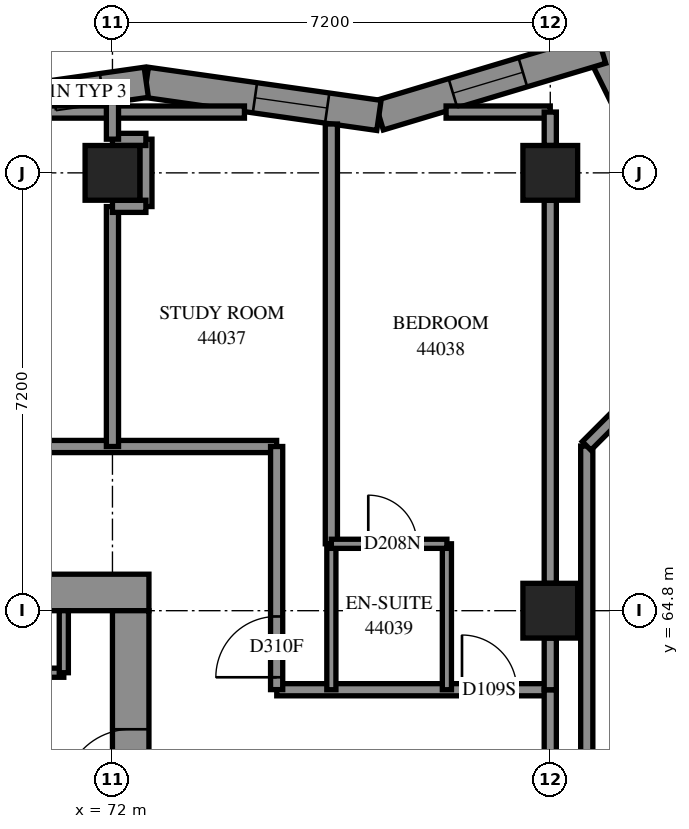
"""IFC4 building model, lengths in metres.
Left out: names, types, materials, properties, quantities, classifications, styles, units other than length and angle.
Written with IfcOpenShell. Run it as: python <this file> out.ifc"""

import sys

from ifc_helpers import new_model, si_unit, direction, frame, frame_2d, origin, origin_2d, place, context, subcontext, project, spatial, polyline, rectangle, outline, extrude, element, fill, save


model = new_model("IFC4")
c1 = context("Model", 3, precision=1e-05, world=origin(), true_north=direction((0.0, 1.0)))
c2 = subcontext(c1, "Body", "Model", "MODEL_VIEW")
j1 = project(units=[si_unit("LENGTHUNIT", "METRE"), si_unit("PLANEANGLEUNIT", "RADIAN")], contexts=[c1])
p1 = place(None, origin())
s1 = spatial("IfcSite", under=j1, at=p1, CompositionType="ELEMENT")
p2 = place(p1, origin())
s2 = spatial("IfcBuilding", under=s1, at=p2, CompositionType="ELEMENT")
p3 = place(p2, frame((0.0, 0.0, 162.6)))
s3 = spatial("IfcBuildingStorey", under=s2, at=p3, CompositionType="ELEMENT", Elevation=162.6)
for number, where, z_axis, x_axis in (
    (1, (72.0, 72.0, 0.0), (0.0, 0.0, 1.0), (1.0, 0.0, 0.0)),
    (2, (79.2, 64.8, 0.0), (0.0, 0.0, 1.0), (1.0, 0.0, 0.0)),
    (3, (79.2, 72.0, 0.0), (0.0, 0.0, 1.0), (1.0, 0.0, 0.0)),
):
    element("IfcColumn", number, at=place(p3, frame(where, z_axis=z_axis, x_axis=x_axis)), inside=s3, PredefinedType="COLUMN", context=c2, shape_type="SweptSolid", body=[
        extrude(rectangle(XDim=0.9, YDim=0.9, at=origin_2d()), origin(), (0.0, 0.0, 1.0), 3.1),
    ])
p4 = place(p3, frame((57.0, 65.1, -0.3), z_axis=(0.0, 0.0, 1.0), x_axis=(1.0, 0.0, 0.0)))
e4 = element("IfcWall", 4, at=p4, inside=s3, PredefinedType="SHEAR", context=c2, shape_type="SweptSolid", body=[
    extrude(rectangle(XDim=15.6, YDim=0.6, at=frame_2d((7.8, 0.0))), origin(), (0.0, 0.0, 1.0), 2.7),
])
p5 = place(p4, frame((10.6, 0.0, 0.3)))
e5 = element("IfcOpeningElement", 5, at=p5, cuts=e4, PredefinedType="OPENING", context=c2, shape_type="SweptSolid", body=[
    extrude(rectangle(XDim=0.8, YDim=2.1, at=frame_2d((0.4, 1.05))), frame((0.0, 0.31, 0.0), z_axis=(0.0, -1.0, 0.0), x_axis=(1.0, 0.0, 0.0)), (0.0, 0.0, 1.0), 0.62),
])
p6 = place(p3, frame((72.3, 50.4, -0.3), z_axis=(0.0, 0.0, 1.0), x_axis=(0.0, 1.0, 0.0)))
e6 = element("IfcWall", 6, at=p6, inside=s3, PredefinedType="SHEAR", context=c2, shape_type="SweptSolid", body=[
    extrude(rectangle(XDim=14.4, YDim=0.6, at=frame_2d((7.2, 0.0))), origin(), (0.0, 0.0, 1.0), 2.7),
])
p7 = place(p6, frame((4.55, 0.0, 0.3)))
e7 = element("IfcOpeningElement", 7, at=p7, cuts=e6, PredefinedType="OPENING", context=c2, shape_type="SweptSolid", body=[
    extrude(rectangle(XDim=1.1, YDim=2.1, at=frame_2d((0.55, 1.05))), frame((0.0, 0.31, 0.0), z_axis=(0.0, -1.0, 0.0), x_axis=(1.0, 0.0, 0.0)), (0.0, 0.0, 1.0), 0.62),
])
p8 = place(p6, frame((11.35, 0.0, 0.3)))
e8 = element("IfcOpeningElement", 8, at=p8, cuts=e6, PredefinedType="OPENING", context=c2, shape_type="SweptSolid", body=[
    extrude(rectangle(XDim=1.1, YDim=2.1, at=frame_2d((0.55, 1.05))), frame((0.0, 0.31, 0.0), z_axis=(0.0, -1.0, 0.0), x_axis=(1.0, 0.0, 0.0)), (0.0, 0.0, 1.0), 0.62),
])
p9 = place(p3, frame((81.557, 70.978, 0.0), z_axis=(0.0, 0.0, 1.0), x_axis=(-0.4436419496, 0.8962041177, 0.0)))
e9 = element("IfcWall", 9, at=p9, inside=s3, PredefinedType="SOLIDWALL", context=c2, shape_type="SweptSolid", body=[
    extrude(outline(polyline([(0.062, -0.25), (3.63, -0.25), (3.208, 0.25), (-0.062, 0.25), (0.062, -0.25)])), origin(), (0.0, 0.0, 1.0), 3.1),
])
p10 = place(p9, frame((0.761, 0.0, 0.45)))
e10 = element("IfcOpeningElement", 10, at=p10, cuts=e9, PredefinedType="OPENING", context=c2, shape_type="SweptSolid", body=[
    extrude(rectangle(XDim=1.2, YDim=2.5, at=frame_2d((0.6, 1.25))), frame((0.0, 0.26, 0.0), z_axis=(0.0, -1.0, 0.0), x_axis=(1.0, 0.0, 0.0)), (0.0, 0.0, 1.0), 0.52),
])
p11 = place(p3, frame((80.04, 74.042, 0.0), z_axis=(0.0, 0.0, 1.0), x_axis=(-0.9578277268, -0.2873430803, 0.0)))
e11 = element("IfcWall", 11, at=p11, inside=s3, PredefinedType="SOLIDWALL", context=c2, shape_type="SweptSolid", body=[
    extrude(outline(polyline([(-0.211, -0.25), (3.764, -0.25), (3.873, 0.25), (0.211, 0.25), (-0.211, -0.25)])), origin(), (0.0, 0.0, 1.0), 3.1),
])
p12 = place(p11, frame((1.348, 0.0, 0.45)))
e12 = element("IfcOpeningElement", 12, at=p12, cuts=e11, PredefinedType="OPENING", context=c2, shape_type="SweptSolid", body=[
    extrude(rectangle(XDim=1.2, YDim=2.5, at=frame_2d((0.6, 1.25))), frame((0.0, 0.26, 0.0), z_axis=(0.0, -1.0, 0.0), x_axis=(1.0, 0.0, 0.0)), (0.0, 0.0, 1.0), 0.52),
])
p13 = place(p3, frame((76.382, 72.945, 0.0), z_axis=(0.0, 0.0, 1.0), x_axis=(-0.9900145925, 0.140964913, 0.0)))
e13 = element("IfcWall", 13, at=p13, inside=s3, PredefinedType="SOLIDWALL", context=c2, shape_type="SweptSolid", body=[
    extrude(outline(polyline([(0.055, -0.25), (3.9, -0.25), (3.829, 0.25), (-0.055, 0.25), (0.055, -0.25)])), origin(), (0.0, 0.0, 1.0), 3.1),
])
p14 = place(p13, frame((0.86, 0.0, 0.45)))
e14 = element("IfcOpeningElement", 14, at=p14, cuts=e13, PredefinedType="OPENING", context=c2, shape_type="SweptSolid", body=[
    extrude(rectangle(XDim=1.2, YDim=2.5, at=frame_2d((0.6, 1.25))), frame((0.0, 0.26, 0.0), z_axis=(0.0, -1.0, 0.0), x_axis=(1.0, 0.0, 0.0)), (0.0, 0.0, 1.0), 0.52),
])
p15 = place(p3, frame((72.556, 73.49, 0.0), z_axis=(0.0, 0.0, 1.0), x_axis=(-0.990016994, -0.1409480459, 0.0)))
e15 = element("IfcWall", 15, at=p15, inside=s3, PredefinedType="SOLIDWALL", context=c2, shape_type="SweptSolid", body=[
    extrude(outline(polyline([(-0.036, -0.25), (3.81, -0.25), (3.881, 0.25), (0.036, 0.25), (-0.036, -0.25)])), origin(), (0.0, 0.0, 1.0), 3.1),
])
p16 = place(p15, frame((0.735, 0.0, 0.45)))
e16 = element("IfcOpeningElement", 16, at=p16, cuts=e15, PredefinedType="OPENING", context=c2, shape_type="SweptSolid", body=[
    extrude(rectangle(XDim=0.8, YDim=2.5, at=frame_2d((0.4, 1.25))), frame((0.0, 0.26, 0.0), z_axis=(0.0, -1.0, 0.0), x_axis=(1.0, 0.0, 0.0)), (0.0, 0.0, 1.0), 0.52),
])
p17 = place(p15, frame((1.985, 0.0, 0.45)))
e17 = element("IfcOpeningElement", 17, at=p17, cuts=e15, PredefinedType="OPENING", context=c2, shape_type="SweptSolid", body=[
    extrude(rectangle(XDim=1.3, YDim=2.5, at=frame_2d((0.65, 1.25))), frame((0.0, 0.26, 0.0), z_axis=(0.0, -1.0, 0.0), x_axis=(1.0, 0.0, 0.0)), (0.0, 0.0, 1.0), 0.52),
])
p18 = place(p3, frame((64.95, 63.78, 0.0), z_axis=(0.0, 0.0, 1.0), x_axis=(1.0, 0.0, 0.0)))
e18 = element("IfcWall", 18, at=p18, inside=s3, PredefinedType="PARTITIONING", context=c2, shape_type="SweptSolid", body=[
    extrude(rectangle(XDim=6.25, YDim=0.15, at=frame_2d((3.125, 0.0))), origin(), (0.0, 0.0, 1.0), 3.1),
])
p19 = place(p3, frame((71.2, 63.78, 0.0), z_axis=(0.0, 0.0, 1.0), x_axis=(0.0, 1.0, 0.0)))
e19 = element("IfcWall", 19, at=p19, inside=s3, PredefinedType="PARTITIONING", context=c2, shape_type="SweptSolid", body=[
    extrude(rectangle(XDim=1.02, YDim=0.15, at=frame_2d((0.51, 0.0))), origin(), (0.0, 0.0, 1.0), 3.1),
])
p20 = place(p3, frame((54.9, 67.5, 0.0), z_axis=(0.0, 0.0, 1.0), x_axis=(1.0, 0.0, 0.0)))
e20 = element("IfcWall", 20, at=p20, inside=s3, PredefinedType="PARTITIONING", context=c2, shape_type="SweptSolid", body=[
    extrude(rectangle(XDim=19.8, YDim=0.2, at=frame_2d((9.9, 0.0))), origin(), (0.0, 0.0, 1.0), 3.1),
])
p21 = place(p20, frame((6.599, 0.0, 0.0)))
e21 = element("IfcOpeningElement", 21, at=p21, cuts=e20, PredefinedType="OPENING", context=c2, shape_type="SweptSolid", body=[
    extrude(rectangle(XDim=0.9, YDim=2.1, at=frame_2d((0.45, 1.05))), frame((0.0, 0.11, 0.0), z_axis=(0.0, -1.0, 0.0), x_axis=(1.0, 0.0, 0.0)), (0.0, 0.0, 1.0), 0.22),
])
p22 = place(p20, frame((14.101, 0.0, 0.0)))
e22 = element("IfcOpeningElement", 22, at=p22, cuts=e20, PredefinedType="OPENING", context=c2, shape_type="SweptSolid", body=[
    extrude(rectangle(XDim=0.9, YDim=2.1, at=frame_2d((0.45, 1.05))), frame((0.0, 0.11, 0.0), z_axis=(0.0, -1.0, 0.0), x_axis=(1.0, 0.0, 0.0)), (0.0, 0.0, 1.0), 0.22),
])
p23 = place(p3, frame((79.8, 56.054, 0.0), z_axis=(0.0, 0.0, 1.0), x_axis=(0.0, 1.0, 0.0)))
e23 = element("IfcWall", 23, at=p23, inside=s3, PredefinedType="PARTITIONING", context=c2, shape_type="SweptSolid", body=[
    extrude(rectangle(XDim=11.454, YDim=0.2, at=frame_2d((5.727, 0.0))), origin(), (0.0, 0.0, 1.0), 3.1),
])
p24 = place(p3, frame((79.799, 56.055, 0.0), z_axis=(0.0, 0.0, 1.0), x_axis=(0.7071067812, 0.7071067812, 0.0)))
e24 = element("IfcWall", 24, at=p24, inside=s3, PredefinedType="PARTITIONING", context=c2, shape_type="SweptSolid", body=[
    extrude(rectangle(XDim=9.95, YDim=0.2, at=frame_2d((4.975, 0.0))), origin(), (0.0, 0.0, 1.0), 3.1),
])
p25 = place(p24, frame((1.071, 0.0, 0.0)))
e25 = element("IfcOpeningElement", 25, at=p25, cuts=e24, PredefinedType="OPENING", context=c2, shape_type="SweptSolid", body=[
    extrude(rectangle(XDim=1.0, YDim=2.1, at=frame_2d((0.5, 1.05))), frame((0.0, 0.11, 0.0), z_axis=(0.0, -1.0, 0.0), x_axis=(1.0, 0.0, 0.0)), (0.0, 0.0, 1.0), 0.22),
])
p26 = place(p3, frame((75.6, 65.9, 0.0), z_axis=(0.0, 0.0, 1.0), x_axis=(0.0, 1.0, 0.0)))
e26 = element("IfcWall", 26, at=p26, inside=s3, PredefinedType="PARTITIONING", context=c2, shape_type="SweptSolid", body=[
    extrude(rectangle(XDim=6.904, YDim=0.2, at=frame_2d((3.452, 0.0))), origin(), (0.0, 0.0, 1.0), 3.1),
])
p27 = place(p3, frame((79.2, 65.25, 0.0), z_axis=(0.0, 0.0, 1.0), x_axis=(0.0, 1.0, 0.0)))
e27 = element("IfcWall", 27, at=p27, inside=s3, PredefinedType="PARTITIONING", context=c2, shape_type="SweptSolid", body=[
    extrude(rectangle(XDim=6.3, YDim=0.2, at=frame_2d((3.15, 0.0))), origin(), (0.0, 0.0, 1.0), 3.1),
])
p28 = place(p3, frame((74.702, 63.5, 0.0), z_axis=(0.0, 0.0, 1.0), x_axis=(1.0, 0.0, 0.0)))
e28 = element("IfcWall", 28, at=p28, inside=s3, PredefinedType="PARTITIONING", context=c2, shape_type="SweptSolid", body=[
    extrude(rectangle(XDim=4.498, YDim=0.2, at=frame_2d((2.249, 0.0))), origin(), (0.0, 0.0, 1.0), 3.1),
])
p29 = place(p28, frame((3.046, 0.0, 0.0)))
e29 = element("IfcOpeningElement", 29, at=p29, cuts=e28, PredefinedType="OPENING", context=c2, shape_type="SweptSolid", body=[
    extrude(rectangle(XDim=0.9, YDim=2.1, at=frame_2d((0.45, 1.05))), frame((0.0, 0.11, 0.0), z_axis=(0.0, -1.0, 0.0), x_axis=(1.0, 0.0, 0.0)), (0.0, 0.0, 1.0), 0.22),
])
p30 = place(p3, frame((74.7, 63.502, 0.0), z_axis=(0.0, 0.0, 1.0), x_axis=(0.0, 1.0, 0.0)))
e30 = element("IfcWall", 30, at=p30, inside=s3, PredefinedType="PARTITIONING", context=c2, shape_type="SweptSolid", body=[
    extrude(rectangle(XDim=3.998, YDim=0.2, at=frame_2d((1.999, 0.0))), origin(), (0.0, 0.0, 1.0), 3.1),
])
p31 = place(p30, frame((0.203, 0.0, 0.0)))
e31 = element("IfcOpeningElement", 31, at=p31, cuts=e30, PredefinedType="OPENING", context=c2, shape_type="SweptSolid", body=[
    extrude(rectangle(XDim=1.0, YDim=2.1, at=frame_2d((0.5, 1.05))), frame((0.0, 0.11, 0.0), z_axis=(0.0, -1.0, 0.0), x_axis=(1.0, 0.0, 0.0)), (0.0, 0.0, 1.0), 0.22),
])
p32 = place(p3, frame((72.0, 67.5, 0.0), z_axis=(0.0, 0.0, 1.0), x_axis=(0.0, 1.0, 0.0)))
e32 = element("IfcWall", 32, at=p32, inside=s3, PredefinedType="PARTITIONING", context=c2, shape_type="SweptSolid", body=[
    extrude(rectangle(XDim=3.946, YDim=0.2, at=frame_2d((1.973, 0.0))), origin(), (0.0, 0.0, 1.0), 3.1),
])
p33 = place(p3, frame((79.798, 67.51, 0.0), z_axis=(0.0, 0.0, 1.0), x_axis=(0.7068316745, 0.7073817809, 0.0)))
e33 = element("IfcWall", 33, at=p33, inside=s3, PredefinedType="PARTITIONING", context=c2, shape_type="SweptSolid", body=[
    extrude(rectangle(XDim=3.636, YDim=0.2, at=frame_2d((1.818, 0.0))), origin(), (0.0, 0.0, 1.0), 3.1),
])
p34 = place(p3, frame((70.942, 73.0, 0.0), z_axis=(0.0, 0.0, 1.0), x_axis=(1.0, 0.0, 0.0)))
e34 = element("IfcWall", 34, at=p34, inside=s3, PredefinedType="PARTITIONING", context=c2, shape_type="SweptSolid", body=[
    extrude(rectangle(XDim=3.229, YDim=0.2, at=frame_2d((1.614, 0.0))), origin(), (0.0, 0.0, 1.0), 3.1),
])
for number, where, z_axis, x_axis in (
    (35, (75.6, 63.5, 0.0), (0.0, 0.0, 1.0), (0.0, 1.0, 0.0)),
    (36, (77.5, 63.5, 0.0), (0.0, 0.0, 1.0), (0.0, 1.0, 0.0)),
):
    element("IfcWall", number, at=place(p3, frame(where, z_axis=z_axis, x_axis=x_axis)), inside=s3, PredefinedType="PARTITIONING", context=c2, shape_type="SweptSolid", body=[
        extrude(rectangle(XDim=2.4, YDim=0.15, at=frame_2d((1.2, 0.0))), origin(), (0.0, 0.0, 1.0), 3.1),
    ])
p35 = place(p3, frame((79.2, 61.3, 0.0), z_axis=(0.0, 0.0, 1.0), x_axis=(0.0, 1.0, 0.0)))
e37 = element("IfcWall", 37, at=p35, inside=s3, PredefinedType="PARTITIONING", context=c2, shape_type="SweptSolid", body=[
    extrude(rectangle(XDim=2.2, YDim=0.2, at=frame_2d((1.1, 0.0))), origin(), (0.0, 0.0, 1.0), 3.1),
])
p36 = place(p3, frame((75.6, 65.9, 0.0), z_axis=(0.0, 0.0, 1.0), x_axis=(1.0, 0.0, 0.0)))
e38 = element("IfcWall", 38, at=p36, inside=s3, PredefinedType="PARTITIONING", context=c2, shape_type="SweptSolid", body=[
    extrude(rectangle(XDim=1.9, YDim=0.15, at=frame_2d((0.95, 0.0))), origin(), (0.0, 0.0, 1.0), 3.1),
])
p37 = place(p36, frame((0.607, 0.0, 0.0)))
e39 = element("IfcOpeningElement", 39, at=p37, cuts=e38, PredefinedType="OPENING", context=c2, shape_type="SweptSolid", body=[
    extrude(rectangle(XDim=0.8, YDim=2.1, at=frame_2d((0.4, 1.05))), frame((0.0, 0.085, 0.0), z_axis=(0.0, -1.0, 0.0), x_axis=(1.0, 0.0, 0.0)), (0.0, 0.0, 1.0), 0.17),
])
p38 = place(p3, frame((77.487, 73.0, 0.0), z_axis=(0.0, 0.0, 1.0), x_axis=(1.0, 0.0, 0.0)))
e40 = element("IfcWall", 40, at=p38, inside=s3, PredefinedType="PARTITIONING", context=c2, shape_type="SweptSolid", body=[
    extrude(rectangle(XDim=1.713, YDim=0.2, at=frame_2d((0.857, 0.0))), origin(), (0.0, 0.0, 1.0), 3.1),
])
p39 = place(p3, frame((72.55, 71.446, 0.0), z_axis=(0.0, 0.0, 1.0), x_axis=(0.0, 1.0, 0.0)))
e41 = element("IfcWall", 41, at=p39, inside=s3, PredefinedType="PARTITIONING", context=c2, shape_type="SweptSolid", body=[
    extrude(rectangle(XDim=1.108, YDim=0.2, at=frame_2d((0.554, 0.0))), origin(), (0.0, 0.0, 1.0), 3.1),
])
p40 = place(p3, frame((79.2, 63.5, 0.0), z_axis=(0.0, 0.0, 1.0), x_axis=(0.0, 1.0, 0.0)))
e42 = element("IfcWall", 42, at=p40, inside=s3, PredefinedType="PARTITIONING", context=c2, shape_type="SweptSolid", body=[
    extrude(rectangle(XDim=0.85, YDim=0.2, at=frame_2d((0.425, 0.0))), origin(), (0.0, 0.0, 1.0), 3.1),
])
for number, where, z_axis, x_axis in (
    (43, (72.0, 71.45, 0.0), (0.0, 0.0, 1.0), (1.0, 0.0, 0.0)),
    (44, (72.0, 72.55, 0.0), (0.0, 0.0, 1.0), (1.0, 0.0, 0.0)),
    (45, (79.2, 72.45, 0.0), (0.0, 0.0, 1.0), (0.0, 1.0, 0.0)),
):
    element("IfcWall", number, at=place(p3, frame(where, z_axis=z_axis, x_axis=x_axis)), inside=s3, PredefinedType="PARTITIONING", context=c2, shape_type="SweptSolid", body=[
        extrude(rectangle(XDim=0.55, YDim=0.2, at=frame_2d((0.275, 0.0))), origin(), (0.0, 0.0, 1.0), 3.1),
    ])
p41 = place(p3, frame((72.0, 72.554, 0.0), z_axis=(0.0, 0.0, 1.0), x_axis=(0.0, 1.0, 0.0)))
e46 = element("IfcWall", 46, at=p41, inside=s3, PredefinedType="PARTITIONING", context=c2, shape_type="SweptSolid", body=[
    extrude(rectangle(XDim=0.604, YDim=0.2, at=frame_2d((0.302, 0.0))), origin(), (0.0, 0.0, 1.0), 3.1),
])
p42 = place(p12, origin())
e47 = element("IfcWindow", 47, at=p42, inside=s3, PartitioningType="SINGLE_PANEL", PredefinedType="WINDOW", context=c2, shape_type="SweptSolid", body=[
    extrude(rectangle(XDim=1.2, YDim=2.5, at=frame_2d((0.6, 1.25))), frame((0.0, 0.18, 0.0), z_axis=(0.0, -1.0, 0.0), x_axis=(1.0, 0.0, 0.0)), (0.0, 0.0, 1.0), 0.06),
])
fill(e12, e47)
p43 = place(p14, origin())
e48 = element("IfcWindow", 48, at=p43, inside=s3, PartitioningType="SINGLE_PANEL", PredefinedType="WINDOW", context=c2, shape_type="SweptSolid", body=[
    extrude(rectangle(XDim=1.2, YDim=2.5, at=frame_2d((0.6, 1.25))), frame((0.0, 0.18, 0.0), z_axis=(0.0, -1.0, 0.0), x_axis=(1.0, 0.0, 0.0)), (0.0, 0.0, 1.0), 0.06),
])
fill(e14, e48)
p44 = place(p8, origin())
e49 = element("IfcDoor", 49, at=p44, inside=s3, OperationType="SINGLE_SWING_RIGHT", PredefinedType="DOOR", context=c2, shape_type="SweptSolid", body=[
    extrude(rectangle(XDim=1.1, YDim=2.1, at=frame_2d((0.55, 1.05))), frame((0.0, 0.025, 0.0), z_axis=(0.0, -1.0, 0.0), x_axis=(1.0, 0.0, 0.0)), (0.0, 0.0, 1.0), 0.05),
])
fill(e8, e49)
p45 = place(p31, origin())
e50 = element("IfcDoor", 50, at=p45, inside=s3, OperationType="SINGLE_SWING_RIGHT", PredefinedType="DOOR", context=c2, shape_type="SweptSolid", body=[
    extrude(rectangle(XDim=1.0, YDim=2.1, at=frame_2d((0.5, 1.05))), frame((0.0, 0.025, 0.0), z_axis=(0.0, -1.0, 0.0), x_axis=(1.0, 0.0, 0.0)), (0.0, 0.0, 1.0), 0.05),
])
fill(e31, e50)
p46 = place(p29, origin())
e51 = element("IfcDoor", 51, at=p46, inside=s3, OperationType="SINGLE_SWING_LEFT", PredefinedType="DOOR", context=c2, shape_type="SweptSolid", body=[
    extrude(rectangle(XDim=0.9, YDim=2.1, at=frame_2d((0.45, 1.05))), frame((0.0, 0.025, 0.0), z_axis=(0.0, -1.0, 0.0), x_axis=(1.0, 0.0, 0.0)), (0.0, 0.0, 1.0), 0.05),
])
fill(e29, e51)
p47 = place(p37, origin())
e52 = element("IfcDoor", 52, at=p47, inside=s3, OperationType="SINGLE_SWING_RIGHT", PredefinedType="DOOR", context=c2, shape_type="SweptSolid", body=[
    extrude(rectangle(XDim=0.8, YDim=2.1, at=frame_2d((0.4, 1.05))), frame((0.0, 0.025, 0.0), z_axis=(0.0, -1.0, 0.0), x_axis=(1.0, 0.0, 0.0)), (0.0, 0.0, 1.0), 0.05),
])
fill(e39, e52)
p48 = place(p16, origin())
e53 = element("IfcWindow", 53, at=p48, inside=s3, PartitioningType="SINGLE_PANEL", PredefinedType="WINDOW", context=c2, shape_type="SweptSolid", body=[
    extrude(rectangle(XDim=0.8, YDim=2.5, at=frame_2d((0.4, 1.25))), frame((0.0, 0.14, 0.0), z_axis=(0.0, -1.0, 0.0), x_axis=(1.0, 0.0, 0.0)), (0.0, 0.0, 1.0), 0.06),
])
fill(e16, e53)
save(model, sys.argv[1])
